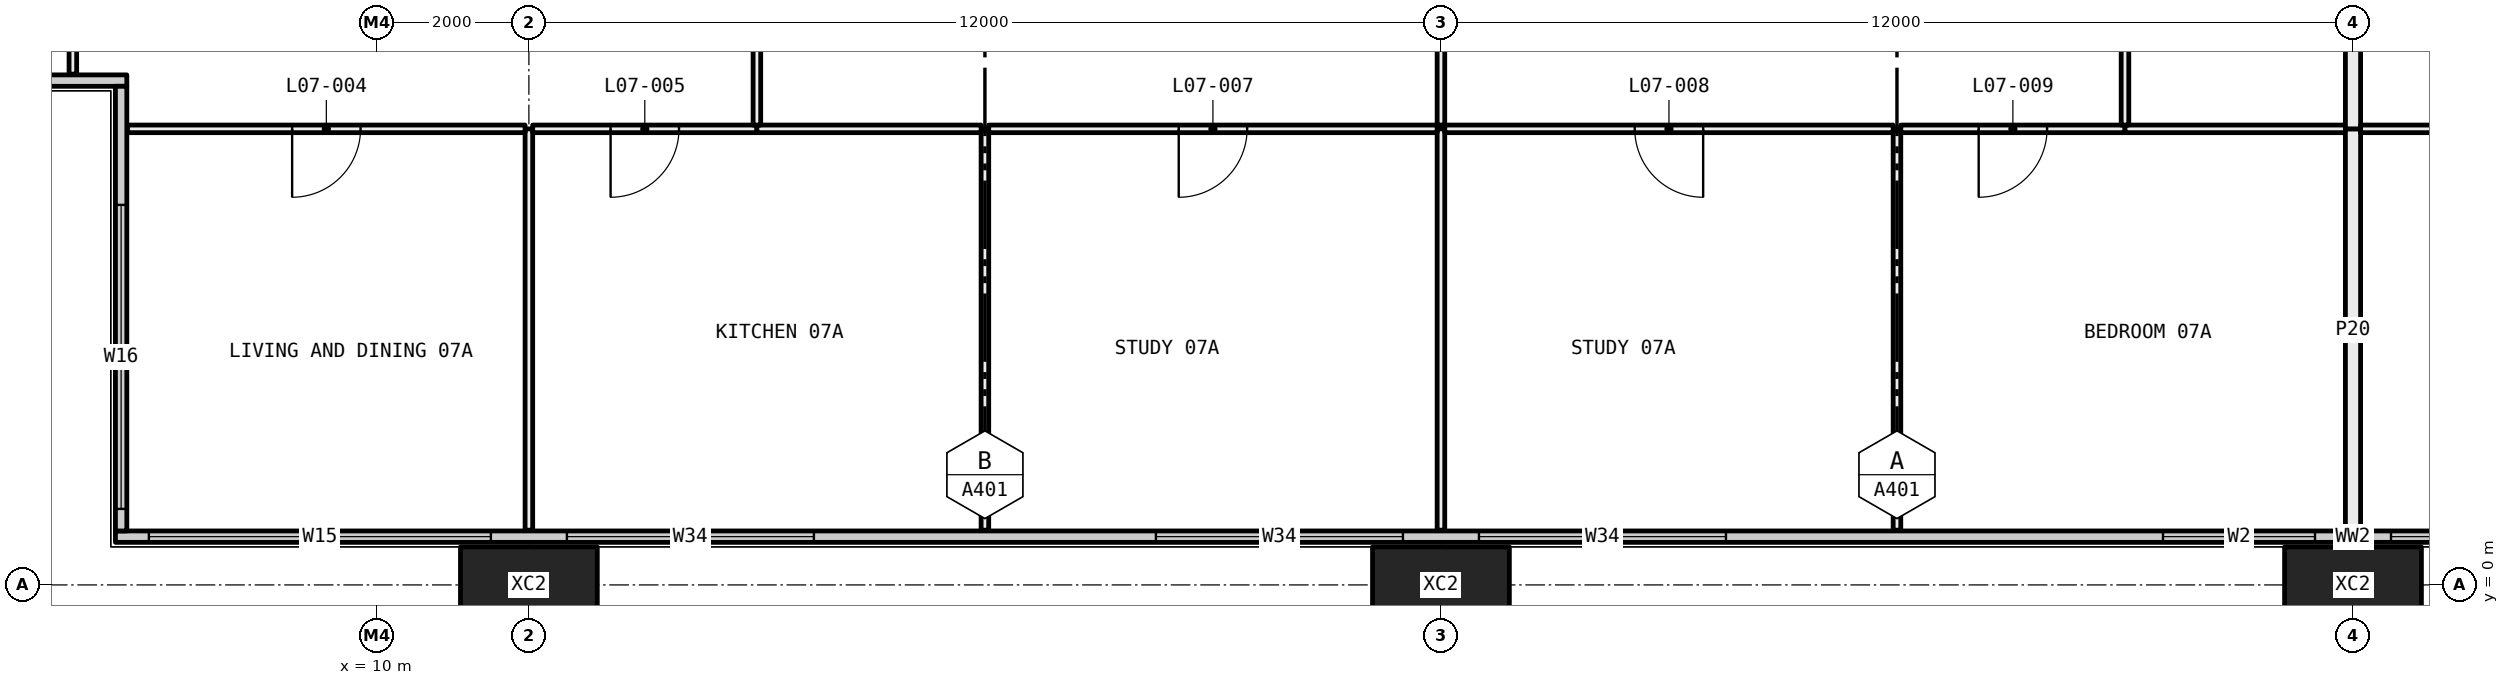
"""IFC4 building model, lengths in metres.
Left out: names, types, materials, properties, quantities, classifications, styles, units other than length and angle.
Written with IfcOpenShell. Run it as: python <this file> out.ifc"""

import sys

from ifc_helpers import new_model, si_unit, direction, frame, frame_2d, origin, origin_2d, place, context, subcontext, project, spatial, rectangle, hollow_rectangle, extrude, element, fill, save


model = new_model("IFC4")
c1 = context("Model", 3, precision=1e-05, world=origin(), true_north=direction((0.0, 1.0)))
c2 = subcontext(c1, "Body", "Model", "MODEL_VIEW")
j1 = project(units=[si_unit("LENGTHUNIT", "METRE"), si_unit("PLANEANGLEUNIT", "RADIAN")], contexts=[c1])
p1 = place(None, origin())
s1 = spatial("IfcSite", under=j1, at=p1, CompositionType="ELEMENT")
p2 = place(p1, origin())
s2 = spatial("IfcBuilding", under=s1, at=p2, CompositionType="ELEMENT")
p3 = place(p2, frame((0.0, 0.0, 36.9)))
s3 = spatial("IfcBuildingStorey", under=s2, at=p3, CompositionType="ELEMENT", Elevation=36.9)
for number, where, z_axis, x_axis in (
    (1, (12.0, 0.0, -0.4), (0.0, 0.0, 1.0), (1.0, 0.0, 0.0)),
    (2, (24.0, 0.0, -0.4), (0.0, 0.0, 1.0), (1.0, 0.0, 0.0)),
    (3, (36.0, 0.0, -0.4), (0.0, 0.0, 1.0), (1.0, 0.0, 0.0)),
):
    element("IfcColumn", number, at=place(p3, frame(where, z_axis=z_axis, x_axis=x_axis)), inside=s3, PredefinedType="COLUMN", context=c2, shape_type="SweptSolid", body=[
        extrude(hollow_rectangle(XDim=1.8, YDim=1.0, WallThickness=0.07, at=origin_2d()), origin(), (0.0, 0.0, 1.0), 3.45),
    ])
p4 = place(p3, frame((6.56, 0.635, 0.0), z_axis=(0.0, 0.0, 1.0), x_axis=(1.0, 0.0, 0.0)))
e4 = element("IfcWall", 4, at=p4, inside=s3, PredefinedType="ELEMENTEDWALL", context=c2, shape_type="SweptSolid", body=[
    extrude(rectangle(XDim=58.88, YDim=0.15, at=frame_2d((29.44, 0.0))), origin(), (0.0, 0.0, 1.0), 3.05),
])
p5 = place(p4, frame((0.44, 0.0, 0.45)))
e5 = element("IfcOpeningElement", 5, at=p5, cuts=e4, PredefinedType="OPENING", context=c2, shape_type="SweptSolid", body=[
    extrude(rectangle(XDim=4.5, YDim=2.55, at=frame_2d((2.25, 1.275))), frame((0.0, 0.085, 0.0), z_axis=(0.0, -1.0, 0.0), x_axis=(1.0, 0.0, 0.0)), (0.0, 0.0, 1.0), 0.17),
])
p6 = place(p4, frame((5.94, 0.0, 0.45)))
e6 = element("IfcOpeningElement", 6, at=p6, cuts=e4, PredefinedType="OPENING", context=c2, shape_type="SweptSolid", body=[
    extrude(rectangle(XDim=3.25, YDim=2.55, at=frame_2d((1.625, 1.275))), frame((0.0, 0.085, 0.0), z_axis=(0.0, -1.0, 0.0), x_axis=(1.0, 0.0, 0.0)), (0.0, 0.0, 1.0), 0.17),
])
p7 = place(p4, frame((13.69, 0.0, 0.45)))
e7 = element("IfcOpeningElement", 7, at=p7, cuts=e4, PredefinedType="OPENING", context=c2, shape_type="SweptSolid", body=[
    extrude(rectangle(XDim=3.25, YDim=2.55, at=frame_2d((1.625, 1.275))), frame((0.0, 0.085, 0.0), z_axis=(0.0, -1.0, 0.0), x_axis=(1.0, 0.0, 0.0)), (0.0, 0.0, 1.0), 0.17),
])
p8 = place(p4, frame((17.94, 0.0, 0.45)))
e8 = element("IfcOpeningElement", 8, at=p8, cuts=e4, PredefinedType="OPENING", context=c2, shape_type="SweptSolid", body=[
    extrude(rectangle(XDim=3.25, YDim=2.55, at=frame_2d((1.625, 1.275))), frame((0.0, 0.085, 0.0), z_axis=(0.0, -1.0, 0.0), x_axis=(1.0, 0.0, 0.0)), (0.0, 0.0, 1.0), 0.17),
])
p9 = place(p4, frame((26.94, 0.0, 0.45)))
e9 = element("IfcOpeningElement", 9, at=p9, cuts=e4, PredefinedType="OPENING", context=c2, shape_type="SweptSolid", body=[
    extrude(rectangle(XDim=2.0, YDim=2.55, at=frame_2d((1.0, 1.275))), frame((0.0, 0.085, 0.0), z_axis=(0.0, -1.0, 0.0), x_axis=(1.0, 0.0, 0.0)), (0.0, 0.0, 1.0), 0.17),
])
p10 = place(p4, frame((29.94, 0.0, 0.45)))
e10 = element("IfcOpeningElement", 10, at=p10, cuts=e4, PredefinedType="OPENING", context=c2, shape_type="SweptSolid", body=[
    extrude(rectangle(XDim=3.25, YDim=2.55, at=frame_2d((1.625, 1.275))), frame((0.0, 0.085, 0.0), z_axis=(0.0, -1.0, 0.0), x_axis=(1.0, 0.0, 0.0)), (0.0, 0.0, 1.0), 0.17),
])
p11 = place(p4, frame((37.69, 0.0, 0.45)))
e11 = element("IfcOpeningElement", 11, at=p11, cuts=e4, PredefinedType="OPENING", context=c2, shape_type="SweptSolid", body=[
    extrude(rectangle(XDim=3.25, YDim=2.55, at=frame_2d((1.625, 1.275))), frame((0.0, 0.085, 0.0), z_axis=(0.0, -1.0, 0.0), x_axis=(1.0, 0.0, 0.0)), (0.0, 0.0, 1.0), 0.17),
])
p12 = place(p4, frame((41.94, 0.0, 0.45)))
e12 = element("IfcOpeningElement", 12, at=p12, cuts=e4, PredefinedType="OPENING", context=c2, shape_type="SweptSolid", body=[
    extrude(rectangle(XDim=3.25, YDim=2.55, at=frame_2d((1.625, 1.275))), frame((0.0, 0.085, 0.0), z_axis=(0.0, -1.0, 0.0), x_axis=(1.0, 0.0, 0.0)), (0.0, 0.0, 1.0), 0.17),
])
p13 = place(p4, frame((50.94, 0.0, 0.45)))
e13 = element("IfcOpeningElement", 13, at=p13, cuts=e4, PredefinedType="OPENING", context=c2, shape_type="SweptSolid", body=[
    extrude(rectangle(XDim=2.0, YDim=2.55, at=frame_2d((1.0, 1.275))), frame((0.0, 0.085, 0.0), z_axis=(0.0, -1.0, 0.0), x_axis=(1.0, 0.0, 0.0)), (0.0, 0.0, 1.0), 0.17),
])
p14 = place(p4, frame((53.94, 0.0, 0.45)))
e14 = element("IfcOpeningElement", 14, at=p14, cuts=e4, PredefinedType="OPENING", context=c2, shape_type="SweptSolid", body=[
    extrude(rectangle(XDim=4.5, YDim=2.55, at=frame_2d((2.25, 1.275))), frame((0.0, 0.085, 0.0), z_axis=(0.0, -1.0, 0.0), x_axis=(1.0, 0.0, 0.0)), (0.0, 0.0, 1.0), 0.17),
])
p15 = place(p3, frame((0.56, 6.635, 0.0), z_axis=(0.0, 0.0, 1.0), x_axis=(1.0, 0.0, 0.0)))
e15 = element("IfcWall", 15, at=p15, inside=s3, PredefinedType="ELEMENTEDWALL", context=c2, shape_type="SweptSolid", body=[
    extrude(rectangle(XDim=6.15, YDim=0.15, at=frame_2d((3.075, 0.0))), origin(), (0.0, 0.0, 1.0), 3.05),
])
p16 = place(p15, frame((0.44, 0.0, 0.45)))
e16 = element("IfcOpeningElement", 16, at=p16, cuts=e15, PredefinedType="OPENING", context=c2, shape_type="SweptSolid", body=[
    extrude(rectangle(XDim=4.0, YDim=2.55, at=frame_2d((2.0, 1.275))), frame((0.0, 0.085, 0.0), z_axis=(0.0, -1.0, 0.0), x_axis=(1.0, 0.0, 0.0)), (0.0, 0.0, 1.0), 0.17),
])
p17 = place(p3, frame((6.635, 0.71, 0.0), z_axis=(0.0, 0.0, 1.0), x_axis=(0.0, 1.0, 0.0)))
e17 = element("IfcWall", 17, at=p17, inside=s3, PredefinedType="ELEMENTEDWALL", context=c2, shape_type="SweptSolid", body=[
    extrude(rectangle(XDim=5.85, YDim=0.15, at=frame_2d((2.925, 0.0))), origin(), (0.0, 0.0, 1.0), 3.05),
])
p18 = place(p17, frame((0.29, 0.0, 0.45)))
e18 = element("IfcOpeningElement", 18, at=p18, cuts=e17, PredefinedType="OPENING", context=c2, shape_type="SweptSolid", body=[
    extrude(rectangle(XDim=4.0, YDim=2.55, at=frame_2d((2.0, 1.275))), frame((0.0, 0.085, 0.0), z_axis=(0.0, -1.0, 0.0), x_axis=(1.0, 0.0, 0.0)), (0.0, 0.0, 1.0), 0.17),
])
p19 = place(p3, frame((12.0, 0.72, 0.0), z_axis=(0.0, 0.0, 1.0), x_axis=(0.0, 1.0, 0.0)))
e19 = element("IfcWall", 19, at=p19, inside=s3, PredefinedType="PARTITIONING", context=c2, shape_type="SweptSolid", body=[
    extrude(rectangle(XDim=5.28, YDim=0.1, at=frame_2d((2.64, 0.0))), origin(), (0.0, 0.0, 1.0), 2.45),
])
p20 = place(p3, frame((11.95, 6.0, 0.0), z_axis=(0.0, 0.0, 1.0), x_axis=(-1.0, 0.0, 0.0)))
e20 = element("IfcWall", 20, at=p20, inside=s3, PredefinedType="PARTITIONING", context=c2, shape_type="SweptSolid", body=[
    extrude(rectangle(XDim=5.23, YDim=0.1, at=frame_2d((2.615, 0.0))), origin(), (0.0, 0.0, 1.0), 2.45),
])
p21 = place(p20, frame((2.165, 0.0, 0.0)))
e21 = element("IfcOpeningElement", 21, at=p21, cuts=e20, PredefinedType="OPENING", context=c2, shape_type="SweptSolid", body=[
    extrude(rectangle(XDim=0.9, YDim=2.1, at=frame_2d((0.45, 1.05))), frame((0.0, 0.06, 0.0), z_axis=(0.0, -1.0, 0.0), x_axis=(1.0, 0.0, 0.0)), (0.0, 0.0, 1.0), 0.12),
])
p22 = place(p3, frame((18.0, 0.72, 0.0), z_axis=(0.0, 0.0, 1.0), x_axis=(0.0, 1.0, 0.0)))
e22 = element("IfcWall", 22, at=p22, inside=s3, PredefinedType="PARTITIONING", context=c2, shape_type="SweptSolid", body=[
    extrude(rectangle(XDim=5.28, YDim=0.1, at=frame_2d((2.64, 0.0))), origin(), (0.0, 0.0, 1.0), 3.05),
])
p23 = place(p3, frame((15.0, 6.0, 0.0), z_axis=(0.0, 0.0, 1.0), x_axis=(-1.0, 0.0, 0.0)))
e23 = element("IfcWall", 23, at=p23, inside=s3, PredefinedType="PARTITIONING", context=c2, shape_type="SweptSolid", body=[
    extrude(rectangle(XDim=2.95, YDim=0.1, at=frame_2d((1.475, 0.0))), origin(), (0.0, 0.0, 1.0), 2.45),
])
p24 = place(p23, frame((1.025, 0.0, 0.0)))
e24 = element("IfcOpeningElement", 24, at=p24, cuts=e23, PredefinedType="OPENING", context=c2, shape_type="SweptSolid", body=[
    extrude(rectangle(XDim=0.9, YDim=2.1, at=frame_2d((0.45, 1.05))), frame((0.0, 0.06, 0.0), z_axis=(0.0, -1.0, 0.0), x_axis=(1.0, 0.0, 0.0)), (0.0, 0.0, 1.0), 0.12),
])
p25 = place(p3, frame((17.95, 6.0, 0.0), z_axis=(0.0, 0.0, 1.0), x_axis=(-1.0, 0.0, 0.0)))
e25 = element("IfcWall", 25, at=p25, inside=s3, PredefinedType="PARTITIONING", context=c2, shape_type="SweptSolid", body=[
    extrude(rectangle(XDim=2.95, YDim=0.1, at=frame_2d((1.475, 0.0))), origin(), (0.0, 0.0, 1.0), 3.05),
])
p26 = place(p3, frame((24.0, 0.72, 0.0), z_axis=(0.0, 0.0, 1.0), x_axis=(0.0, 1.0, 0.0)))
e26 = element("IfcWall", 26, at=p26, inside=s3, PredefinedType="PARTITIONING", context=c2, shape_type="SweptSolid", body=[
    extrude(rectangle(XDim=5.28, YDim=0.1, at=frame_2d((2.64, 0.0))), origin(), (0.0, 0.0, 1.0), 2.45),
])
p27 = place(p3, frame((23.95, 6.0, 0.0), z_axis=(0.0, 0.0, 1.0), x_axis=(-1.0, 0.0, 0.0)))
e27 = element("IfcWall", 27, at=p27, inside=s3, PredefinedType="PARTITIONING", context=c2, shape_type="SweptSolid", body=[
    extrude(rectangle(XDim=5.9, YDim=0.1, at=frame_2d((2.95, 0.0))), origin(), (0.0, 0.0, 1.0), 2.45),
])
p28 = place(p27, frame((2.5, 0.0, 0.0)))
e28 = element("IfcOpeningElement", 28, at=p28, cuts=e27, PredefinedType="OPENING", context=c2, shape_type="SweptSolid", body=[
    extrude(rectangle(XDim=0.9, YDim=2.1, at=frame_2d((0.45, 1.05))), frame((0.0, 0.06, 0.0), z_axis=(0.0, -1.0, 0.0), x_axis=(1.0, 0.0, 0.0)), (0.0, 0.0, 1.0), 0.12),
])
p29 = place(p3, frame((30.0, 0.72, 0.0), z_axis=(0.0, 0.0, 1.0), x_axis=(0.0, 1.0, 0.0)))
e29 = element("IfcWall", 29, at=p29, inside=s3, PredefinedType="PARTITIONING", context=c2, shape_type="SweptSolid", body=[
    extrude(rectangle(XDim=5.28, YDim=0.1, at=frame_2d((2.64, 0.0))), origin(), (0.0, 0.0, 1.0), 3.05),
])
p30 = place(p3, frame((29.95, 6.0, 0.0), z_axis=(0.0, 0.0, 1.0), x_axis=(-1.0, 0.0, 0.0)))
e30 = element("IfcWall", 30, at=p30, inside=s3, PredefinedType="PARTITIONING", context=c2, shape_type="SweptSolid", body=[
    extrude(rectangle(XDim=5.9, YDim=0.1, at=frame_2d((2.95, 0.0))), origin(), (0.0, 0.0, 1.0), 2.45),
])
p31 = place(p30, frame((2.5, 0.0, 0.0)))
e31 = element("IfcOpeningElement", 31, at=p31, cuts=e30, PredefinedType="OPENING", context=c2, shape_type="SweptSolid", body=[
    extrude(rectangle(XDim=0.9, YDim=2.1, at=frame_2d((0.45, 1.05))), frame((0.0, 0.06, 0.0), z_axis=(0.0, -1.0, 0.0), x_axis=(1.0, 0.0, 0.0)), (0.0, 0.0, 1.0), 0.12),
])
p32 = place(p3, frame((33.0, 6.0, 0.0), z_axis=(0.0, 0.0, 1.0), x_axis=(-1.0, 0.0, 0.0)))
e32 = element("IfcWall", 32, at=p32, inside=s3, PredefinedType="PARTITIONING", context=c2, shape_type="SweptSolid", body=[
    extrude(rectangle(XDim=2.95, YDim=0.1, at=frame_2d((1.475, 0.0))), origin(), (0.0, 0.0, 1.0), 3.05),
])
p33 = place(p32, frame((1.025, 0.0, 0.0)))
e33 = element("IfcOpeningElement", 33, at=p33, cuts=e32, PredefinedType="OPENING", context=c2, shape_type="SweptSolid", body=[
    extrude(rectangle(XDim=0.9, YDim=2.1, at=frame_2d((0.45, 1.05))), frame((0.0, 0.06, 0.0), z_axis=(0.0, -1.0, 0.0), x_axis=(1.0, 0.0, 0.0)), (0.0, 0.0, 1.0), 0.12),
])
p34 = place(p3, frame((35.9, 6.0, 0.0), z_axis=(0.0, 0.0, 1.0), x_axis=(-1.0, 0.0, 0.0)))
e34 = element("IfcWall", 34, at=p34, inside=s3, PredefinedType="PARTITIONING", context=c2, shape_type="SweptSolid", body=[
    extrude(rectangle(XDim=2.9, YDim=0.1, at=frame_2d((1.45, 0.0))), origin(), (0.0, 0.0, 1.0), 3.05),
])
p35 = place(p3, frame((36.0, 0.72, 0.0), z_axis=(0.0, 0.0, 1.0), x_axis=(0.0, 1.0, 0.0)))
e35 = element("IfcWall", 35, at=p35, inside=s3, PredefinedType="PARTITIONING", context=c2, shape_type="SweptSolid", body=[
    extrude(rectangle(XDim=5.28, YDim=0.2, at=frame_2d((2.64, 0.0))), origin(), (0.0, 0.0, 1.0), 2.45),
])
p36 = place(p3, frame((6.0, 6.72, 0.0), z_axis=(0.0, 0.0, 1.0), x_axis=(0.0, 1.0, 0.0)))
e36 = element("IfcWall", 36, at=p36, inside=s3, PredefinedType="PARTITIONING", context=c2, shape_type="SweptSolid", body=[
    extrude(rectangle(XDim=5.28, YDim=0.1, at=frame_2d((2.64, 0.0))), origin(), (0.0, 0.0, 1.0), 2.45),
])
p37 = place(p36, frame((2.19, 0.0, 0.0)))
e37 = element("IfcOpeningElement", 37, at=p37, cuts=e36, PredefinedType="OPENING", context=c2, shape_type="SweptSolid", body=[
    extrude(rectangle(XDim=0.9, YDim=2.1, at=frame_2d((0.45, 1.05))), frame((0.0, 0.06, 0.0), z_axis=(0.0, -1.0, 0.0), x_axis=(1.0, 0.0, 0.0)), (0.0, 0.0, 1.0), 0.12),
])
p38 = place(p3, frame((15.0, 6.05, 0.0), z_axis=(0.0, 0.0, 1.0), x_axis=(0.0, 1.0, 0.0)))
e38 = element("IfcWall", 38, at=p38, inside=s3, PredefinedType="PARTITIONING", context=c2, shape_type="SweptSolid", body=[
    extrude(rectangle(XDim=5.95, YDim=0.1, at=frame_2d((2.975, 0.0))), origin(), (0.0, 0.0, 1.0), 2.45),
])
p39 = place(p3, frame((24.0, 6.05, 0.0), z_axis=(0.0, 0.0, 1.0), x_axis=(0.0, 1.0, 0.0)))
e39 = element("IfcWall", 39, at=p39, inside=s3, PredefinedType="PARTITIONING", context=c2, shape_type="SweptSolid", body=[
    extrude(rectangle(XDim=5.15, YDim=0.1, at=frame_2d((2.575, 0.0))), origin(), (0.0, 0.0, 1.0), 2.45),
])
p40 = place(p39, frame((2.125, 0.0, 0.0)))
e40 = element("IfcOpeningElement", 40, at=p40, cuts=e39, PredefinedType="OPENING", context=c2, shape_type="SweptSolid", body=[
    extrude(rectangle(XDim=0.9, YDim=2.1, at=frame_2d((0.45, 1.05))), frame((0.0, 0.06, 0.0), z_axis=(0.0, -1.0, 0.0), x_axis=(1.0, 0.0, 0.0)), (0.0, 0.0, 1.0), 0.12),
])
p41 = place(p3, frame((33.0, 6.05, 0.0), z_axis=(0.0, 0.0, 1.0), x_axis=(0.0, 1.0, 0.0)))
e41 = element("IfcWall", 41, at=p41, inside=s3, PredefinedType="PARTITIONING", context=c2, shape_type="SweptSolid", body=[
    extrude(rectangle(XDim=5.95, YDim=0.1, at=frame_2d((2.975, 0.0))), origin(), (0.0, 0.0, 1.0), 2.45),
])
p42 = place(p41, frame((2.525, 0.0, 0.0)))
e42 = element("IfcOpeningElement", 42, at=p42, cuts=e41, PredefinedType="OPENING", context=c2, shape_type="SweptSolid", body=[
    extrude(rectangle(XDim=0.9, YDim=2.1, at=frame_2d((0.45, 1.05))), frame((0.0, 0.06, 0.0), z_axis=(0.0, -1.0, 0.0), x_axis=(1.0, 0.0, 0.0)), (0.0, 0.0, 1.0), 0.12),
])
p43 = place(p3, frame((36.0, 6.0, 0.0), z_axis=(0.0, 0.0, 1.0), x_axis=(0.0, 1.0, 0.0)))
e43 = element("IfcWall", 43, at=p43, inside=s3, PredefinedType="PARTITIONING", context=c2, shape_type="SweptSolid", body=[
    extrude(rectangle(XDim=5.2, YDim=0.2, at=frame_2d((2.6, 0.0))), origin(), (0.0, 0.0, 1.0), 2.45),
])
p44 = place(p3, frame((39.0, 6.0, 0.0), z_axis=(0.0, 0.0, 1.0), x_axis=(-1.0, 0.0, 0.0)))
e44 = element("IfcWall", 44, at=p44, inside=s3, PredefinedType="PARTITIONING", context=c2, shape_type="SweptSolid", body=[
    extrude(rectangle(XDim=2.9, YDim=0.1, at=frame_2d((1.45, 0.0))), origin(), (0.0, 0.0, 1.0), 3.05),
])
p45 = place(p5, origin())
e45 = element("IfcWindow", 45, at=p45, inside=s3, PartitioningType="SINGLE_PANEL", PredefinedType="WINDOW", context=c2, shape_type="SweptSolid", body=[
    extrude(rectangle(XDim=4.5, YDim=2.55, at=frame_2d((2.25, 1.275))), frame((0.0, 0.03, 0.0), z_axis=(0.0, -1.0, 0.0), x_axis=(1.0, 0.0, 0.0)), (0.0, 0.0, 1.0), 0.06),
])
fill(e5, e45)
p46 = place(p6, origin())
e46 = element("IfcWindow", 46, at=p46, inside=s3, PartitioningType="SINGLE_PANEL", PredefinedType="WINDOW", context=c2, shape_type="SweptSolid", body=[
    extrude(rectangle(XDim=3.25, YDim=2.55, at=frame_2d((1.625, 1.275))), frame((0.0, 0.03, 0.0), z_axis=(0.0, -1.0, 0.0), x_axis=(1.0, 0.0, 0.0)), (0.0, 0.0, 1.0), 0.06),
])
fill(e6, e46)
p47 = place(p7, origin())
e47 = element("IfcWindow", 47, at=p47, inside=s3, PartitioningType="SINGLE_PANEL", PredefinedType="WINDOW", context=c2, shape_type="SweptSolid", body=[
    extrude(rectangle(XDim=3.25, YDim=2.55, at=frame_2d((1.625, 1.275))), frame((0.0, 0.03, 0.0), z_axis=(0.0, -1.0, 0.0), x_axis=(1.0, 0.0, 0.0)), (0.0, 0.0, 1.0), 0.06),
])
fill(e7, e47)
p48 = place(p8, origin())
e48 = element("IfcWindow", 48, at=p48, inside=s3, PartitioningType="SINGLE_PANEL", PredefinedType="WINDOW", context=c2, shape_type="SweptSolid", body=[
    extrude(rectangle(XDim=3.25, YDim=2.55, at=frame_2d((1.625, 1.275))), frame((0.0, 0.03, 0.0), z_axis=(0.0, -1.0, 0.0), x_axis=(1.0, 0.0, 0.0)), (0.0, 0.0, 1.0), 0.06),
])
fill(e8, e48)
p49 = place(p9, origin())
e49 = element("IfcWindow", 49, at=p49, inside=s3, PartitioningType="SINGLE_PANEL", PredefinedType="WINDOW", context=c2, shape_type="SweptSolid", body=[
    extrude(rectangle(XDim=2.0, YDim=2.55, at=frame_2d((1.0, 1.275))), frame((0.0, 0.03, 0.0), z_axis=(0.0, -1.0, 0.0), x_axis=(1.0, 0.0, 0.0)), (0.0, 0.0, 1.0), 0.06),
])
fill(e9, e49)
p50 = place(p10, origin())
e50 = element("IfcWindow", 50, at=p50, inside=s3, PartitioningType="SINGLE_PANEL", PredefinedType="WINDOW", context=c2, shape_type="SweptSolid", body=[
    extrude(rectangle(XDim=3.25, YDim=2.55, at=frame_2d((1.625, 1.275))), frame((0.0, 0.03, 0.0), z_axis=(0.0, -1.0, 0.0), x_axis=(1.0, 0.0, 0.0)), (0.0, 0.0, 1.0), 0.06),
])
fill(e10, e50)
p51 = place(p18, origin())
e51 = element("IfcWindow", 51, at=p51, inside=s3, PartitioningType="SINGLE_PANEL", PredefinedType="WINDOW", context=c2, shape_type="SweptSolid", body=[
    extrude(rectangle(XDim=4.0, YDim=2.55, at=frame_2d((2.0, 1.275))), frame((0.0, 0.03, 0.0), z_axis=(0.0, -1.0, 0.0), x_axis=(1.0, 0.0, 0.0)), (0.0, 0.0, 1.0), 0.06),
])
fill(e18, e51)
p52 = place(p21, origin())
e52 = element("IfcDoor", 52, at=p52, inside=s3, OperationType="SINGLE_SWING_LEFT", PredefinedType="DOOR", context=c2, shape_type="SweptSolid", body=[
    extrude(rectangle(XDim=0.9, YDim=2.1, at=frame_2d((0.45, 1.05))), frame((0.0, 0.025, 0.0), z_axis=(0.0, -1.0, 0.0), x_axis=(1.0, 0.0, 0.0)), (0.0, 0.0, 1.0), 0.05),
])
fill(e21, e52)
p53 = place(p24, origin())
e53 = element("IfcDoor", 53, at=p53, inside=s3, OperationType="SINGLE_SWING_LEFT", PredefinedType="DOOR", context=c2, shape_type="SweptSolid", body=[
    extrude(rectangle(XDim=0.9, YDim=2.1, at=frame_2d((0.45, 1.05))), frame((0.0, 0.025, 0.0), z_axis=(0.0, -1.0, 0.0), x_axis=(1.0, 0.0, 0.0)), (0.0, 0.0, 1.0), 0.05),
])
fill(e24, e53)
p54 = place(p28, origin())
e54 = element("IfcDoor", 54, at=p54, inside=s3, OperationType="SINGLE_SWING_LEFT", PredefinedType="DOOR", context=c2, shape_type="SweptSolid", body=[
    extrude(rectangle(XDim=0.9, YDim=2.1, at=frame_2d((0.45, 1.05))), frame((0.0, 0.025, 0.0), z_axis=(0.0, -1.0, 0.0), x_axis=(1.0, 0.0, 0.0)), (0.0, 0.0, 1.0), 0.05),
])
fill(e28, e54)
p55 = place(p31, origin())
e55 = element("IfcDoor", 55, at=p55, inside=s3, OperationType="SINGLE_SWING_RIGHT", PredefinedType="DOOR", context=c2, shape_type="SweptSolid", body=[
    extrude(rectangle(XDim=0.9, YDim=2.1, at=frame_2d((0.45, 1.05))), frame((0.0, 0.025, 0.0), z_axis=(0.0, -1.0, 0.0), x_axis=(1.0, 0.0, 0.0)), (0.0, 0.0, 1.0), 0.05),
])
fill(e31, e55)
p56 = place(p33, origin())
e56 = element("IfcDoor", 56, at=p56, inside=s3, OperationType="SINGLE_SWING_LEFT", PredefinedType="DOOR", context=c2, shape_type="SweptSolid", body=[
    extrude(rectangle(XDim=0.9, YDim=2.1, at=frame_2d((0.45, 1.05))), frame((0.0, 0.025, 0.0), z_axis=(0.0, -1.0, 0.0), x_axis=(1.0, 0.0, 0.0)), (0.0, 0.0, 1.0), 0.05),
])
fill(e33, e56)
save(model, sys.argv[1])
